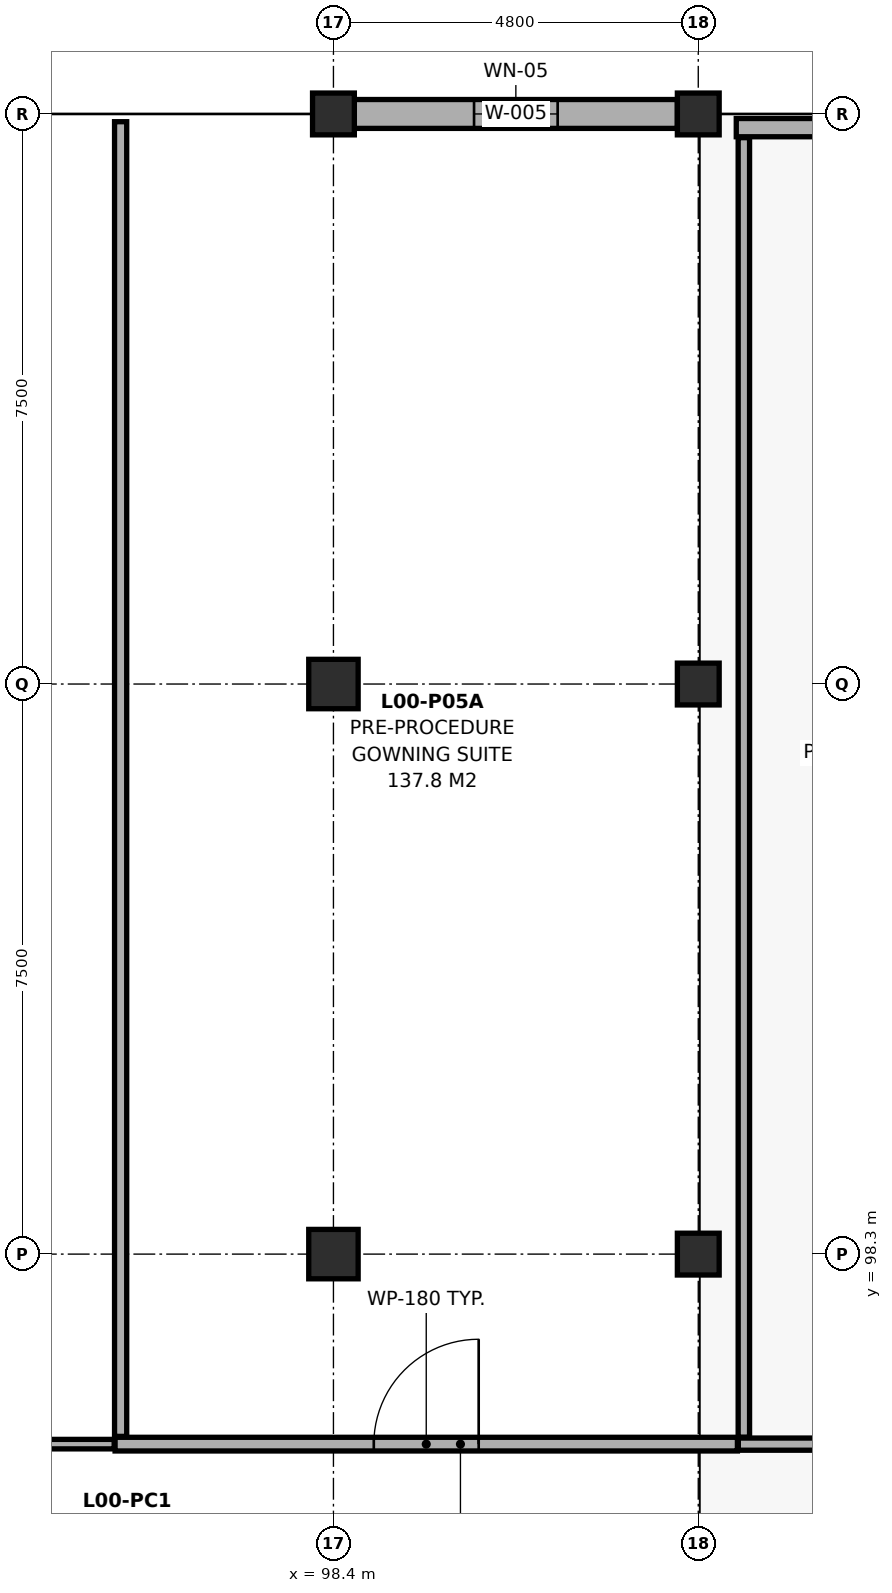
"""IFC4 building model, lengths in metres.
Left out: names, types, materials, properties, quantities, classifications, styles, units other than length and angle.
Written with IfcOpenShell. Run it as: python <this file> out.ifc"""

import sys

from ifc_helpers import new_model, si_unit, direction, frame, frame_2d, origin, origin_2d, place, context, subcontext, project, spatial, rectangle, extrude, element, fill, save


model = new_model("IFC4")
c1 = context("Model", 3, precision=1e-05, world=origin(), true_north=direction((0.0, 1.0)))
c2 = subcontext(c1, "Body", "Model", "MODEL_VIEW")
j1 = project(units=[si_unit("LENGTHUNIT", "METRE"), si_unit("PLANEANGLEUNIT", "RADIAN")], contexts=[c1])
p1 = place(None, origin())
s1 = spatial("IfcSite", under=j1, at=p1, CompositionType="ELEMENT")
p2 = place(p1, origin())
s2 = spatial("IfcBuilding", under=s1, at=p2, CompositionType="ELEMENT")
p3 = place(p2, origin())
s3 = spatial("IfcBuildingStorey", under=s2, at=p3, CompositionType="ELEMENT", Elevation=0.0)
for number, where, z_axis, x_axis in (
    (1, (98.4, 98.3, 0.0), (0.0, 0.0, 1.0), (1.0, 0.0, 0.0)),
    (2, (98.4, 105.8, 0.0), (0.0, 0.0, 1.0), (1.0, 0.0, 0.0)),
):
    element("IfcColumn", number, at=place(p3, frame(where, z_axis=z_axis, x_axis=x_axis)), inside=s3, PredefinedType="COLUMN", context=c2, shape_type="SweptSolid", body=[
        extrude(rectangle(XDim=0.65, YDim=0.65, at=origin_2d()), origin(), (0.0, 0.0, 1.0), 4.7),
    ])
for number, where, z_axis, x_axis in (
    (3, (98.4, 113.3, 0.0), (0.0, 0.0, 1.0), (1.0, 0.0, 0.0)),
    (4, (103.2, 98.3, 0.0), (0.0, 0.0, 1.0), (1.0, 0.0, 0.0)),
    (5, (103.2, 105.8, 0.0), (0.0, 0.0, 1.0), (1.0, 0.0, 0.0)),
    (6, (103.2, 113.3, 0.0), (0.0, 0.0, 1.0), (1.0, 0.0, 0.0)),
):
    element("IfcColumn", number, at=place(p3, frame(where, z_axis=z_axis, x_axis=x_axis)), inside=s3, PredefinedType="COLUMN", context=c2, shape_type="SweptSolid", body=[
        extrude(rectangle(XDim=0.55, YDim=0.55, at=origin_2d()), origin(), (0.0, 0.0, 1.0), 4.7),
    ])
p4 = place(p3, frame((98.675, 113.3, 0.0), z_axis=(0.0, 0.0, 1.0), x_axis=(1.0, 0.0, 0.0)))
e7 = element("IfcWall", 7, at=p4, inside=s3, PredefinedType="SOLIDWALL", context=c2, shape_type="SweptSolid", body=[
    extrude(rectangle(XDim=4.25, YDim=0.38, at=frame_2d((2.125, 0.0))), origin(), (0.0, 0.0, 1.0), 3.985),
])
p5 = place(p4, frame((1.575, 0.0, 0.9)))
e8 = element("IfcOpeningElement", 8, at=p5, cuts=e7, PredefinedType="OPENING", context=c2, shape_type="SweptSolid", body=[
    extrude(rectangle(XDim=1.1, YDim=1.3, at=frame_2d((0.55, 0.65))), frame((0.0, 0.202, 0.0), z_axis=(0.0, -1.0, 0.0), x_axis=(1.0, 0.0, 0.0)), (0.0, 0.0, 1.0), 0.404),
])
p6 = place(p3, frame((103.7, 113.12, 4.9), z_axis=(0.0, 0.0, 1.0), x_axis=(1.0, 0.0, 0.0)))
e9 = element("IfcWall", 9, at=p6, inside=s3, PredefinedType="PARAPET", context=c2, shape_type="SweptSolid", body=[
    extrude(rectangle(XDim=3.8, YDim=0.24, at=frame_2d((1.9, 0.0))), origin(), (0.0, 0.0, 1.0), 0.6),
])
p7 = place(p3, frame((83.285, 95.8, 0.0), z_axis=(0.0, 0.0, 1.0), x_axis=(1.0, 0.0, 0.0)))
e10 = element("IfcWall", 10, at=p7, inside=s3, PredefinedType="PARTITIONING", context=c2, shape_type="SweptSolid", body=[
    extrude(rectangle(XDim=12.23, YDim=0.125, at=frame_2d((6.115, 0.0))), origin(), (0.0, 0.0, 1.0), 3.985),
])
p8 = place(p7, frame((5.255, 0.0, 0.0)))
e11 = element("IfcOpeningElement", 11, at=p8, cuts=e10, PredefinedType="OPENING", context=c2, shape_type="SweptSolid", body=[
    extrude(rectangle(XDim=1.72, YDim=2.34, at=frame_2d((0.86, 1.17))), frame((0.0, 0.074, 0.0), z_axis=(0.0, -1.0, 0.0), x_axis=(1.0, 0.0, 0.0)), (0.0, 0.0, 1.0), 0.149),
])
p9 = place(p3, frame((95.527, 95.8, 0.0), z_axis=(0.0, 0.0, 1.0), x_axis=(1.0, 0.0, 0.0)))
e12 = element("IfcWall", 12, at=p9, inside=s3, PredefinedType="PARTITIONING", context=c2, shape_type="SweptSolid", body=[
    extrude(rectangle(XDim=8.188, YDim=0.18, at=frame_2d((4.094, 0.0))), origin(), (0.0, 0.0, 1.0), 3.985),
])
p10 = place(p9, frame((3.404, 0.0, 0.0)))
e13 = element("IfcOpeningElement", 13, at=p10, cuts=e12, PredefinedType="OPENING", context=c2, shape_type="SweptSolid", body=[
    extrude(rectangle(XDim=1.38, YDim=2.3, at=frame_2d((0.69, 1.15))), frame((0.0, 0.102, 0.0), z_axis=(0.0, -1.0, 0.0), x_axis=(1.0, 0.0, 0.0)), (0.0, 0.0, 1.0), 0.204),
])
p11 = place(p3, frame((103.727, 95.8, 0.0), z_axis=(0.0, 0.0, 1.0), x_axis=(1.0, 0.0, 0.0)))
e14 = element("IfcWall", 14, at=p11, inside=s3, PredefinedType="PARTITIONING", context=c2, shape_type="SweptSolid", body=[
    extrude(rectangle(XDim=4.108, YDim=0.16, at=frame_2d((2.054, 0.0))), origin(), (0.0, 0.0, 1.0), 4.035),
])
p12 = place(p11, frame((1.334, 0.0, 0.0)))
e15 = element("IfcOpeningElement", 15, at=p12, cuts=e14, PredefinedType="OPENING", context=c2, shape_type="SweptSolid", body=[
    extrude(rectangle(XDim=1.44, YDim=2.32, at=frame_2d((0.72, 1.16))), frame((0.0, 0.092, 0.0), z_axis=(0.0, -1.0, 0.0), x_axis=(1.0, 0.0, 0.0)), (0.0, 0.0, 1.0), 0.184),
])
p13 = place(p3, frame((95.6, 95.902, 0.0), z_axis=(0.0, 0.0, 1.0), x_axis=(0.0, 1.0, 0.0)))
e16 = element("IfcWall", 16, at=p13, inside=s3, PredefinedType="PARTITIONING", context=c2, shape_type="SweptSolid", body=[
    extrude(rectangle(XDim=17.296, YDim=0.16, at=frame_2d((8.648, 0.0))), origin(), (0.0, 0.0, 1.0), 4.035),
])
p14 = place(p3, frame((103.8, 95.892, 0.0), z_axis=(0.0, 0.0, 1.0), x_axis=(0.0, 1.0, 0.0)))
e17 = element("IfcWall", 17, at=p14, inside=s3, PredefinedType="PARTITIONING", context=c2, shape_type="SweptSolid", body=[
    extrude(rectangle(XDim=17.096, YDim=0.15, at=frame_2d((8.548, 0.0))), origin(), (0.0, 0.0, 1.0), 4.7),
])
p15 = place(p5, origin())
e18 = element("IfcWindow", 18, at=p15, inside=s3, PartitioningType="SINGLE_PANEL", PredefinedType="WINDOW", context=c2, shape_type="SweptSolid", body=[
    extrude(rectangle(XDim=1.1, YDim=1.3, at=frame_2d((0.55, 0.65))), frame((0.0, 0.03, 0.0), z_axis=(0.0, -1.0, 0.0), x_axis=(1.0, 0.0, 0.0)), (0.0, 0.0, 1.0), 0.06),
])
fill(e8, e18)
p16 = place(p10, origin())
e19 = element("IfcDoor", 19, at=p16, inside=s3, OperationType="SINGLE_SWING_RIGHT", PredefinedType="DOOR", context=c2, shape_type="SweptSolid", body=[
    extrude(rectangle(XDim=1.38, YDim=2.3, at=frame_2d((0.69, 1.15))), frame((0.0, 0.025, 0.0), z_axis=(0.0, -1.0, 0.0), x_axis=(1.0, 0.0, 0.0)), (0.0, 0.0, 1.0), 0.05),
])
fill(e13, e19)
save(model, sys.argv[1])
